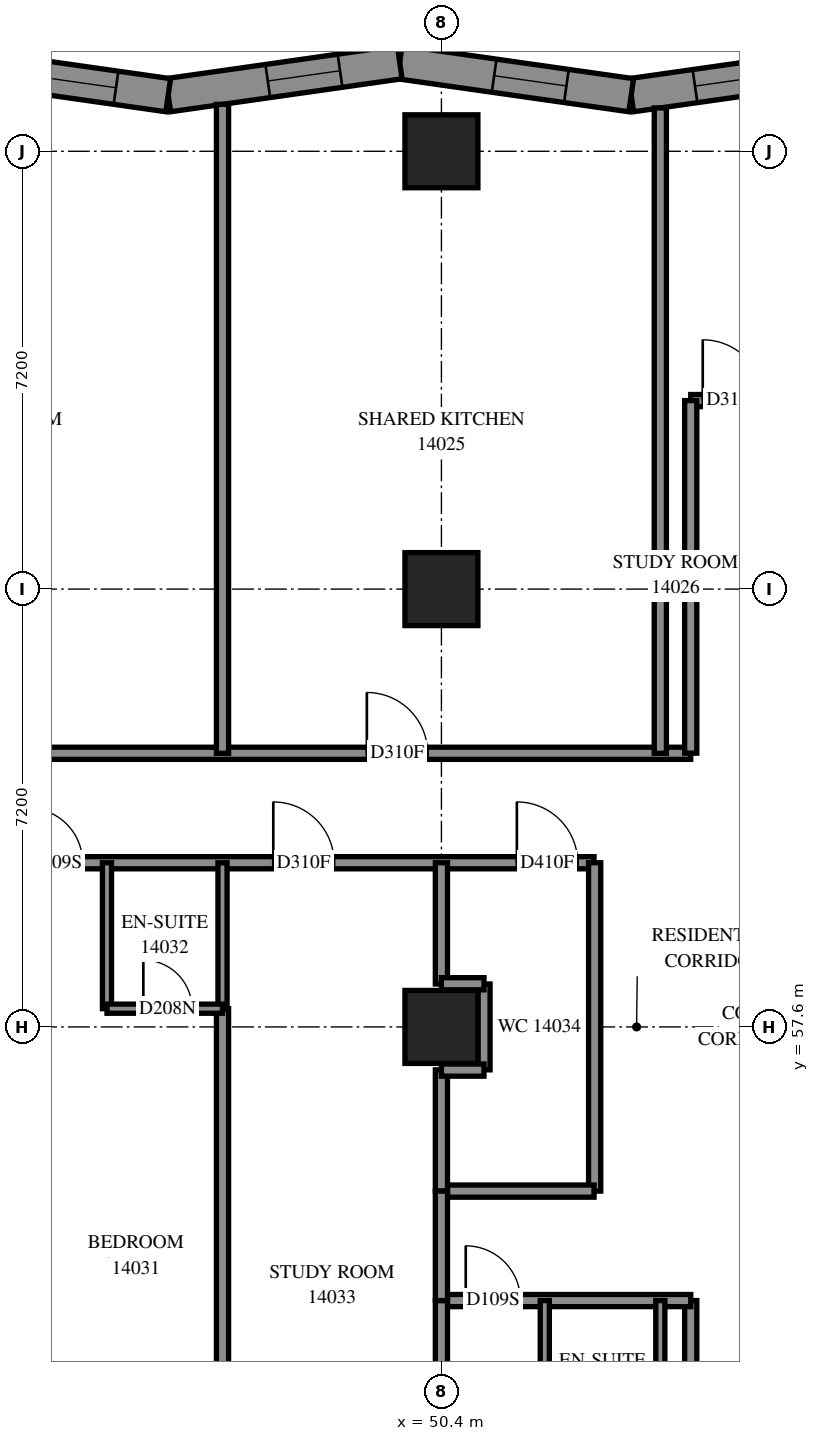
"""IFC4 building model, lengths in metres.
Left out: names, types, materials, properties, quantities, classifications, styles, units other than length and angle.
Written with IfcOpenShell. Run it as: python <this file> out.ifc"""

import sys

from ifc_helpers import new_model, si_unit, direction, frame, frame_2d, origin, origin_2d, place, context, subcontext, project, spatial, polyline, rectangle, outline, extrude, element, fill, save


model = new_model("IFC4")
c1 = context("Model", 3, precision=1e-05, world=origin(), true_north=direction((0.0, 1.0)))
c2 = subcontext(c1, "Body", "Model", "MODEL_VIEW")
j1 = project(units=[si_unit("LENGTHUNIT", "METRE"), si_unit("PLANEANGLEUNIT", "RADIAN")], contexts=[c1])
p1 = place(None, origin())
s1 = spatial("IfcSite", under=j1, at=p1, CompositionType="ELEMENT")
p2 = place(p1, origin())
s2 = spatial("IfcBuilding", under=s1, at=p2, CompositionType="ELEMENT")
p3 = place(p2, frame((0.0, 0.0, 54.2)))
s3 = spatial("IfcBuildingStorey", under=s2, at=p3, CompositionType="ELEMENT", Elevation=54.2)
for number, where, z_axis, x_axis in (
    (1, (50.4, 57.6, 0.0), (0.0, 0.0, 1.0), (1.0, 0.0, 0.0)),
    (2, (50.4, 64.8, 0.0), (0.0, 0.0, 1.0), (1.0, 0.0, 0.0)),
    (3, (50.4, 72.0, 0.0), (0.0, 0.0, 1.0), (1.0, 0.0, 0.0)),
):
    element("IfcColumn", number, at=place(p3, frame(where, z_axis=z_axis, x_axis=x_axis)), inside=s3, PredefinedType="COLUMN", context=c2, shape_type="SweptSolid", body=[
        extrude(rectangle(XDim=1.2, YDim=1.2, at=origin_2d()), origin(), (0.0, 0.0, 1.0), 3.1),
    ])
p4 = place(p3, frame((57.328, 73.464, 0.0), z_axis=(0.0, 0.0, 1.0), x_axis=(-0.990016994, -0.1409480459, 0.0)))
e4 = element("IfcWall", 4, at=p4, inside=s3, PredefinedType="SOLIDWALL", context=c2, shape_type="SweptSolid", body=[
    extrude(outline(polyline([(-0.039, -0.275), (3.806, -0.275), (3.885, 0.275), (0.039, 0.275), (-0.039, -0.275)])), origin(), (0.0, 0.0, 1.0), 3.1),
])
p5 = place(p4, frame((0.986, 0.0, 0.7)))
e5 = element("IfcOpeningElement", 5, at=p5, cuts=e4, PredefinedType="OPENING", context=c2, shape_type="SweptSolid", body=[
    extrude(rectangle(XDim=1.8, YDim=2.2, at=frame_2d((0.9, 1.1))), frame((0.0, 0.285, 0.0), z_axis=(0.0, -1.0, 0.0), x_axis=(1.0, 0.0, 0.0)), (0.0, 0.0, 1.0), 0.57),
])
p6 = place(p3, frame((53.521, 72.922, 0.0), z_axis=(0.0, 0.0, 1.0), x_axis=(-0.990016994, 0.1409480459, 0.0)))
e6 = element("IfcWall", 6, at=p6, inside=s3, PredefinedType="SOLIDWALL", context=c2, shape_type="SweptSolid", body=[
    extrude(outline(polyline([(0.039, -0.275), (3.885, -0.275), (3.806, 0.275), (-0.039, 0.275), (0.039, -0.275)])), origin(), (0.0, 0.0, 1.0), 3.1),
])
p7 = place(p6, frame((1.076, 0.0, 0.5)))
e7 = element("IfcOpeningElement", 7, at=p7, cuts=e6, PredefinedType="OPENING", context=c2, shape_type="SweptSolid", body=[
    extrude(rectangle(XDim=1.2, YDim=2.45, at=frame_2d((0.6, 1.225))), frame((0.0, 0.285, 0.0), z_axis=(0.0, -1.0, 0.0), x_axis=(1.0, 0.0, 0.0)), (0.0, 0.0, 1.0), 0.57),
])
p8 = place(p3, frame((49.714, 73.464, 0.0), z_axis=(0.0, 0.0, 1.0), x_axis=(-0.990016994, -0.1409480459, 0.0)))
e8 = element("IfcWall", 8, at=p8, inside=s3, PredefinedType="SOLIDWALL", context=c2, shape_type="SweptSolid", body=[
    extrude(outline(polyline([(-0.039, -0.275), (3.806, -0.275), (3.885, 0.275), (0.039, 0.275), (-0.039, -0.275)])), origin(), (0.0, 0.0, 1.0), 3.1),
])
p9 = place(p8, frame((0.991, 0.0, 0.5)))
e9 = element("IfcOpeningElement", 9, at=p9, cuts=e8, PredefinedType="OPENING", context=c2, shape_type="SweptSolid", body=[
    extrude(rectangle(XDim=1.2, YDim=2.45, at=frame_2d((0.6, 1.225))), frame((0.0, 0.285, 0.0), z_axis=(0.0, -1.0, 0.0), x_axis=(1.0, 0.0, 0.0)), (0.0, 0.0, 1.0), 0.57),
])
p10 = place(p3, frame((45.907, 72.922, 0.0), z_axis=(0.0, 0.0, 1.0), x_axis=(-0.9900175106, 0.1409444172, 0.0)))
e10 = element("IfcWall", 10, at=p10, inside=s3, PredefinedType="SOLIDWALL", context=c2, shape_type="SweptSolid", body=[
    extrude(outline(polyline([(0.039, -0.275), (3.885, -0.275), (3.806, 0.275), (-0.039, 0.275), (0.039, -0.275)])), origin(), (0.0, 0.0, 1.0), 3.1),
])
p11 = place(p10, frame((0.867, 0.0, 0.5)))
e11 = element("IfcOpeningElement", 11, at=p11, cuts=e10, PredefinedType="OPENING", context=c2, shape_type="SweptSolid", body=[
    extrude(rectangle(XDim=1.2, YDim=2.45, at=frame_2d((0.6, 1.225))), frame((0.0, 0.285, 0.0), z_axis=(0.0, -1.0, 0.0), x_axis=(1.0, 0.0, 0.0)), (0.0, 0.0, 1.0), 0.57),
])
p12 = place(p3, frame((28.802, 60.3, 0.0), z_axis=(0.0, 0.0, 1.0), x_axis=(1.0, 0.0, 0.0)))
e12 = element("IfcWall", 12, at=p12, inside=s3, PredefinedType="PARTITIONING", context=c2, shape_type="SweptSolid", body=[
    extrude(rectangle(XDim=24.108, YDim=0.2, at=frame_2d((12.054, 0.0))), origin(), (0.0, 0.0, 1.0), 3.1),
])
p13 = place(p12, frame((11.323, 0.0, 0.0)))
e13 = element("IfcOpeningElement", 13, at=p13, cuts=e12, PredefinedType="OPENING", context=c2, shape_type="SweptSolid", body=[
    extrude(rectangle(XDim=1.0, YDim=2.1, at=frame_2d((0.5, 1.05))), frame((0.0, 0.11, 0.0), z_axis=(0.0, -1.0, 0.0), x_axis=(1.0, 0.0, 0.0)), (0.0, 0.0, 1.0), 0.22),
])
p14 = place(p12, frame((14.798, 0.0, 0.0)))
e14 = element("IfcOpeningElement", 14, at=p14, cuts=e12, PredefinedType="OPENING", context=c2, shape_type="SweptSolid", body=[
    extrude(rectangle(XDim=0.9, YDim=2.1, at=frame_2d((0.45, 1.05))), frame((0.0, 0.11, 0.0), z_axis=(0.0, -1.0, 0.0), x_axis=(1.0, 0.0, 0.0)), (0.0, 0.0, 1.0), 0.22),
])
p15 = place(p12, frame((18.833, 0.0, 0.0)))
e15 = element("IfcOpeningElement", 15, at=p15, cuts=e12, PredefinedType="OPENING", context=c2, shape_type="SweptSolid", body=[
    extrude(rectangle(XDim=1.0, YDim=2.1, at=frame_2d((0.5, 1.05))), frame((0.0, 0.11, 0.0), z_axis=(0.0, -1.0, 0.0), x_axis=(1.0, 0.0, 0.0)), (0.0, 0.0, 1.0), 0.22),
])
p16 = place(p12, frame((22.839, 0.0, 0.0)))
e16 = element("IfcOpeningElement", 16, at=p16, cuts=e12, PredefinedType="OPENING", context=c2, shape_type="SweptSolid", body=[
    extrude(rectangle(XDim=1.0, YDim=2.1, at=frame_2d((0.5, 1.05))), frame((0.0, 0.11, 0.0), z_axis=(0.0, -1.0, 0.0), x_axis=(1.0, 0.0, 0.0)), (0.0, 0.0, 1.0), 0.22),
])
p17 = place(p3, frame((33.3, 62.1, 0.0), z_axis=(0.0, 0.0, 1.0), x_axis=(1.0, 0.0, 0.0)))
e17 = element("IfcWall", 17, at=p17, inside=s3, PredefinedType="PARTITIONING", context=c2, shape_type="SweptSolid", body=[
    extrude(rectangle(XDim=21.2, YDim=0.2, at=frame_2d((10.6, 0.0))), origin(), (0.0, 0.0, 1.0), 3.1),
])
p18 = place(p17, frame((1.395, 0.0, 0.0)))
e18 = element("IfcOpeningElement", 18, at=p18, cuts=e17, PredefinedType="OPENING", context=c2, shape_type="SweptSolid", body=[
    extrude(rectangle(XDim=0.9, YDim=2.1, at=frame_2d((0.45, 1.05))), frame((0.0, 0.11, 0.0), z_axis=(0.0, -1.0, 0.0), x_axis=(1.0, 0.0, 0.0)), (0.0, 0.0, 1.0), 0.22),
])
p19 = place(p17, frame((8.674, 0.0, 0.0)))
e19 = element("IfcOpeningElement", 19, at=p19, cuts=e17, PredefinedType="OPENING", context=c2, shape_type="SweptSolid", body=[
    extrude(rectangle(XDim=1.0, YDim=2.1, at=frame_2d((0.5, 1.05))), frame((0.0, 0.11, 0.0), z_axis=(0.0, -1.0, 0.0), x_axis=(1.0, 0.0, 0.0)), (0.0, 0.0, 1.0), 0.22),
])
p20 = place(p17, frame((15.874, 0.0, 0.0)))
e20 = element("IfcOpeningElement", 20, at=p20, cuts=e17, PredefinedType="OPENING", context=c2, shape_type="SweptSolid", body=[
    extrude(rectangle(XDim=1.0, YDim=2.1, at=frame_2d((0.5, 1.05))), frame((0.0, 0.11, 0.0), z_axis=(0.0, -1.0, 0.0), x_axis=(1.0, 0.0, 0.0)), (0.0, 0.0, 1.0), 0.22),
])
p21 = place(p3, frame((54.5, 67.9, 0.0), z_axis=(0.0, 0.0, 1.0), x_axis=(1.0, 0.0, 0.0)))
e21 = element("IfcWall", 21, at=p21, inside=s3, PredefinedType="PARTITIONING", context=c2, shape_type="SweptSolid", body=[
    extrude(rectangle(XDim=20.6, YDim=0.2, at=frame_2d((10.3, 0.0))), origin(), (0.0, 0.0, 1.0), 3.1),
])
p22 = place(p21, frame((0.198, 0.0, 0.0)))
e22 = element("IfcOpeningElement", 22, at=p22, cuts=e21, PredefinedType="OPENING", context=c2, shape_type="SweptSolid", body=[
    extrude(rectangle(XDim=1.0, YDim=2.1, at=frame_2d((0.5, 1.05))), frame((0.0, 0.11, 0.0), z_axis=(0.0, -1.0, 0.0), x_axis=(1.0, 0.0, 0.0)), (0.0, 0.0, 1.0), 0.22),
])
p23 = place(p21, frame((19.358, 0.0, 0.0)))
e23 = element("IfcOpeningElement", 23, at=p23, cuts=e21, PredefinedType="OPENING", context=c2, shape_type="SweptSolid", body=[
    extrude(rectangle(XDim=1.0, YDim=2.1, at=frame_2d((0.5, 1.05))), frame((0.0, 0.11, 0.0), z_axis=(0.0, -1.0, 0.0), x_axis=(1.0, 0.0, 0.0)), (0.0, 0.0, 1.0), 0.22),
])
p24 = place(p21, frame((6.698, 0.0, 0.0)))
e24 = element("IfcOpeningElement", 24, at=p24, cuts=e21, PredefinedType="OPENING", context=c2, shape_type="SweptSolid", body=[
    extrude(rectangle(XDim=0.9, YDim=2.1, at=frame_2d((0.45, 1.05))), frame((0.0, 0.11, 0.0), z_axis=(0.0, -1.0, 0.0), x_axis=(1.0, 0.0, 0.0)), (0.0, 0.0, 1.0), 0.22),
])
p25 = place(p21, frame((13.884, 0.0, 0.0)))
e25 = element("IfcOpeningElement", 25, at=p25, cuts=e21, PredefinedType="OPENING", context=c2, shape_type="SweptSolid", body=[
    extrude(rectangle(XDim=1.0, YDim=2.1, at=frame_2d((0.5, 1.05))), frame((0.0, 0.11, 0.0), z_axis=(0.0, -1.0, 0.0), x_axis=(1.0, 0.0, 0.0)), (0.0, 0.0, 1.0), 0.22),
])
p26 = place(p3, frame((46.8, 62.1, 0.0), z_axis=(0.0, 0.0, 1.0), x_axis=(0.0, 1.0, 0.0)))
e26 = element("IfcWall", 26, at=p26, inside=s3, PredefinedType="PARTITIONING", context=c2, shape_type="SweptSolid", body=[
    extrude(rectangle(XDim=10.672, YDim=0.2, at=frame_2d((5.336, 0.0))), origin(), (0.0, 0.0, 1.0), 3.1),
])
p27 = place(p3, frame((54.0, 62.1, 0.0), z_axis=(0.0, 0.0, 1.0), x_axis=(0.0, 1.0, 0.0)))
e27 = element("IfcWall", 27, at=p27, inside=s3, PredefinedType="PARTITIONING", context=c2, shape_type="SweptSolid", body=[
    extrude(rectangle(XDim=10.613, YDim=0.2, at=frame_2d((5.306, 0.0))), origin(), (0.0, 0.0, 1.0), 3.1),
])
p28 = place(p3, frame((46.8, 49.75, 0.0), z_axis=(0.0, 0.0, 1.0), x_axis=(0.0, 1.0, 0.0)))
e28 = element("IfcWall", 28, at=p28, inside=s3, PredefinedType="PARTITIONING", context=c2, shape_type="SweptSolid", body=[
    extrude(rectangle(XDim=8.15, YDim=0.2, at=frame_2d((4.075, 0.0))), origin(), (0.0, 0.0, 1.0), 3.1),
])
p29 = place(p3, frame((54.5, 47.3, 0.0), z_axis=(0.0, 0.0, 1.0), x_axis=(0.0, 1.0, 0.0)))
e29 = element("IfcWall", 29, at=p29, inside=s3, PredefinedType="PARTITIONING", context=c2, shape_type="SweptSolid", body=[
    extrude(rectangle(XDim=5.8, YDim=0.2, at=frame_2d((2.9, 0.0))), origin(), (0.0, 0.0, 1.0), 3.1),
])
p30 = place(p3, frame((54.5, 62.102, 0.0), z_axis=(0.0, 0.0, 1.0), x_axis=(0.0, 1.0, 0.0)))
e30 = element("IfcWall", 30, at=p30, inside=s3, PredefinedType="PARTITIONING", context=c2, shape_type="SweptSolid", body=[
    extrude(rectangle(XDim=5.798, YDim=0.2, at=frame_2d((2.899, 0.0))), origin(), (0.0, 0.0, 1.0), 3.1),
])
p31 = place(p3, frame((52.92, 54.9, 0.0), z_axis=(0.0, 0.0, 1.0), x_axis=(0.0, 1.0, 0.0)))
e31 = element("IfcWall", 31, at=p31, inside=s3, PredefinedType="PARTITIONING", context=c2, shape_type="SweptSolid", body=[
    extrude(rectangle(XDim=5.4, YDim=0.2, at=frame_2d((2.7, 0.0))), origin(), (0.0, 0.0, 1.0), 3.1),
])
p32 = place(p3, frame((50.4, 53.1, 0.0), z_axis=(0.0, 0.0, 1.0), x_axis=(1.0, 0.0, 0.0)))
e32 = element("IfcWall", 32, at=p32, inside=s3, PredefinedType="PARTITIONING", context=c2, shape_type="SweptSolid", body=[
    extrude(rectangle(XDim=4.1, YDim=0.2, at=frame_2d((2.05, 0.0))), origin(), (0.0, 0.0, 1.0), 3.1),
])
p33 = place(p32, frame((0.4, 0.0, 0.0)))
e33 = element("IfcOpeningElement", 33, at=p33, cuts=e32, PredefinedType="OPENING", context=c2, shape_type="SweptSolid", body=[
    extrude(rectangle(XDim=0.9, YDim=2.1, at=frame_2d((0.45, 1.05))), frame((0.0, 0.11, 0.0), z_axis=(0.0, -1.0, 0.0), x_axis=(1.0, 0.0, 0.0)), (0.0, 0.0, 1.0), 0.22),
])
p34 = place(p3, frame((50.4, 54.9, 0.0), z_axis=(0.0, 0.0, 1.0), x_axis=(1.0, 0.0, 0.0)))
e34 = element("IfcWall", 34, at=p34, inside=s3, PredefinedType="PARTITIONING", context=c2, shape_type="SweptSolid", body=[
    extrude(rectangle(XDim=2.51, YDim=0.2, at=frame_2d((1.255, 0.0))), origin(), (0.0, 0.0, 1.0), 3.1),
])
for number, where, z_axis, x_axis in (
    (35, (44.9, 57.9, 0.0), (0.0, 0.0, 1.0), (0.0, 1.0, 0.0)),
    (36, (46.8, 57.9, 0.0), (0.0, 0.0, 1.0), (0.0, 1.0, 0.0)),
    (37, (52.1, 50.7, 0.0), (0.0, 0.0, 1.0), (0.0, 1.0, 0.0)),
    (38, (54.0, 50.7, 0.0), (0.0, 0.0, 1.0), (0.0, 1.0, 0.0)),
):
    element("IfcWall", number, at=place(p3, frame(where, z_axis=z_axis, x_axis=x_axis)), inside=s3, PredefinedType="PARTITIONING", context=c2, shape_type="SweptSolid", body=[
        extrude(rectangle(XDim=2.4, YDim=0.15, at=frame_2d((1.2, 0.0))), origin(), (0.0, 0.0, 1.0), 3.1),
    ])
p35 = place(p3, frame((50.4, 51.0, 0.0), z_axis=(0.0, 0.0, 1.0), x_axis=(0.0, 1.0, 0.0)))
e39 = element("IfcWall", 39, at=p35, inside=s3, PredefinedType="PARTITIONING", context=c2, shape_type="SweptSolid", body=[
    extrude(rectangle(XDim=2.1, YDim=0.2, at=frame_2d((1.05, 0.0))), origin(), (0.0, 0.0, 1.0), 3.1),
])
for number, where, z_axis, x_axis in (
    (40, (50.4, 54.9, 0.0), (0.0, 0.0, 1.0), (0.0, 1.0, 0.0)),
    (41, (50.4, 58.306, 0.0), (0.0, 0.0, 1.0), (0.0, 1.0, 0.0)),
):
    element("IfcWall", number, at=place(p3, frame(where, z_axis=z_axis, x_axis=x_axis)), inside=s3, PredefinedType="PARTITIONING", context=c2, shape_type="SweptSolid", body=[
        extrude(rectangle(XDim=1.994, YDim=0.2, at=frame_2d((0.997, 0.0))), origin(), (0.0, 0.0, 1.0), 3.1),
    ])
p36 = place(p3, frame((44.9, 57.9, 0.0), z_axis=(0.0, 0.0, 1.0), x_axis=(1.0, 0.0, 0.0)))
e42 = element("IfcWall", 42, at=p36, inside=s3, PredefinedType="PARTITIONING", context=c2, shape_type="SweptSolid", body=[
    extrude(rectangle(XDim=1.9, YDim=0.15, at=frame_2d((0.95, 0.0))), origin(), (0.0, 0.0, 1.0), 3.1),
])
p37 = place(p36, frame((0.598, 0.0, 0.0)))
e43 = element("IfcOpeningElement", 43, at=p37, cuts=e42, PredefinedType="OPENING", context=c2, shape_type="SweptSolid", body=[
    extrude(rectangle(XDim=0.8, YDim=2.1, at=frame_2d((0.4, 1.05))), frame((0.0, 0.085, 0.0), z_axis=(0.0, -1.0, 0.0), x_axis=(1.0, 0.0, 0.0)), (0.0, 0.0, 1.0), 0.17),
])
p38 = place(p3, frame((50.4, 53.1, 0.0), z_axis=(0.0, 0.0, 1.0), x_axis=(0.0, 1.0, 0.0)))
e44 = element("IfcWall", 44, at=p38, inside=s3, PredefinedType="PARTITIONING", context=c2, shape_type="SweptSolid", body=[
    extrude(rectangle(XDim=1.8, YDim=0.2, at=frame_2d((0.9, 0.0))), origin(), (0.0, 0.0, 1.0), 3.1),
])
p39 = place(p3, frame((51.1, 56.894, 0.0), z_axis=(0.0, 0.0, 1.0), x_axis=(0.0, 1.0, 0.0)))
e45 = element("IfcWall", 45, at=p39, inside=s3, PredefinedType="PARTITIONING", context=c2, shape_type="SweptSolid", body=[
    extrude(rectangle(XDim=1.412, YDim=0.2, at=frame_2d((0.706, 0.0))), origin(), (0.0, 0.0, 1.0), 3.1),
])
for number, where, z_axis, x_axis in (
    (46, (50.4, 58.31, 0.0), (0.0, 0.0, 1.0), (1.0, 0.0, 0.0)),
    (47, (50.4, 56.89, 0.0), (0.0, 0.0, 1.0), (1.0, 0.0, 0.0)),
):
    element("IfcWall", number, at=place(p3, frame(where, z_axis=z_axis, x_axis=x_axis)), inside=s3, PredefinedType="PARTITIONING", context=c2, shape_type="SweptSolid", body=[
        extrude(rectangle(XDim=0.7, YDim=0.2, at=frame_2d((0.35, 0.0))), origin(), (0.0, 0.0, 1.0), 3.1),
    ])
p40 = place(p7, origin())
e48 = element("IfcWindow", 48, at=p40, inside=s3, PartitioningType="SINGLE_PANEL", PredefinedType="WINDOW", context=c2, shape_type="SweptSolid", body=[
    extrude(rectangle(XDim=1.2, YDim=2.45, at=frame_2d((0.6, 1.225))), frame((0.0, 0.155, 0.0), z_axis=(0.0, -1.0, 0.0), x_axis=(1.0, 0.0, 0.0)), (0.0, 0.0, 1.0), 0.06),
])
fill(e7, e48)
p41 = place(p9, origin())
e49 = element("IfcWindow", 49, at=p41, inside=s3, PartitioningType="SINGLE_PANEL", PredefinedType="WINDOW", context=c2, shape_type="SweptSolid", body=[
    extrude(rectangle(XDim=1.2, YDim=2.45, at=frame_2d((0.6, 1.225))), frame((0.0, 0.155, 0.0), z_axis=(0.0, -1.0, 0.0), x_axis=(1.0, 0.0, 0.0)), (0.0, 0.0, 1.0), 0.06),
])
fill(e9, e49)
p42 = place(p11, origin())
e50 = element("IfcWindow", 50, at=p42, inside=s3, PartitioningType="SINGLE_PANEL", PredefinedType="WINDOW", context=c2, shape_type="SweptSolid", body=[
    extrude(rectangle(XDim=1.2, YDim=2.45, at=frame_2d((0.6, 1.225))), frame((0.0, 0.155, 0.0), z_axis=(0.0, -1.0, 0.0), x_axis=(1.0, 0.0, 0.0)), (0.0, 0.0, 1.0), 0.06),
])
fill(e11, e50)
p43 = place(p20, origin())
e51 = element("IfcDoor", 51, at=p43, inside=s3, OperationType="SINGLE_SWING_LEFT", PredefinedType="DOOR", context=c2, shape_type="SweptSolid", body=[
    extrude(rectangle(XDim=1.0, YDim=2.1, at=frame_2d((0.5, 1.05))), frame((0.0, 0.025, 0.0), z_axis=(0.0, -1.0, 0.0), x_axis=(1.0, 0.0, 0.0)), (0.0, 0.0, 1.0), 0.05),
])
fill(e20, e51)
p44 = place(p22, origin())
e52 = element("IfcDoor", 52, at=p44, inside=s3, OperationType="SINGLE_SWING_LEFT", PredefinedType="DOOR", context=c2, shape_type="SweptSolid", body=[
    extrude(rectangle(XDim=1.0, YDim=2.1, at=frame_2d((0.5, 1.05))), frame((0.0, 0.025, 0.0), z_axis=(0.0, -1.0, 0.0), x_axis=(1.0, 0.0, 0.0)), (0.0, 0.0, 1.0), 0.05),
])
fill(e22, e52)
p45 = place(p14, origin())
e53 = element("IfcDoor", 53, at=p45, inside=s3, OperationType="SINGLE_SWING_LEFT", PredefinedType="DOOR", context=c2, shape_type="SweptSolid", body=[
    extrude(rectangle(XDim=0.9, YDim=2.1, at=frame_2d((0.45, 1.05))), frame((0.0, 0.025, 0.0), z_axis=(0.0, -1.0, 0.0), x_axis=(1.0, 0.0, 0.0)), (0.0, 0.0, 1.0), 0.05),
])
fill(e14, e53)
p46 = place(p37, origin())
e54 = element("IfcDoor", 54, at=p46, inside=s3, OperationType="SINGLE_SWING_RIGHT", PredefinedType="DOOR", context=c2, shape_type="SweptSolid", body=[
    extrude(rectangle(XDim=0.8, YDim=2.1, at=frame_2d((0.4, 1.05))), frame((0.0, 0.025, 0.0), z_axis=(0.0, -1.0, 0.0), x_axis=(1.0, 0.0, 0.0)), (0.0, 0.0, 1.0), 0.05),
])
fill(e43, e54)
p47 = place(p15, origin())
e55 = element("IfcDoor", 55, at=p47, inside=s3, OperationType="SINGLE_SWING_RIGHT", PredefinedType="DOOR", context=c2, shape_type="SweptSolid", body=[
    extrude(rectangle(XDim=1.0, YDim=2.1, at=frame_2d((0.5, 1.05))), frame((0.0, 0.025, 0.0), z_axis=(0.0, -1.0, 0.0), x_axis=(1.0, 0.0, 0.0)), (0.0, 0.0, 1.0), 0.05),
])
fill(e15, e55)
p48 = place(p16, origin())
e56 = element("IfcDoor", 56, at=p48, inside=s3, OperationType="SINGLE_SWING_LEFT", PredefinedType="DOOR", context=c2, shape_type="SweptSolid", body=[
    extrude(rectangle(XDim=1.0, YDim=2.1, at=frame_2d((0.5, 1.05))), frame((0.0, 0.025, 0.0), z_axis=(0.0, -1.0, 0.0), x_axis=(1.0, 0.0, 0.0)), (0.0, 0.0, 1.0), 0.05),
])
fill(e16, e56)
p49 = place(p33, origin())
e57 = element("IfcDoor", 57, at=p49, inside=s3, OperationType="SINGLE_SWING_LEFT", PredefinedType="DOOR", context=c2, shape_type="SweptSolid", body=[
    extrude(rectangle(XDim=0.9, YDim=2.1, at=frame_2d((0.45, 1.05))), frame((0.0, 0.025, 0.0), z_axis=(0.0, -1.0, 0.0), x_axis=(1.0, 0.0, 0.0)), (0.0, 0.0, 1.0), 0.05),
])
fill(e33, e57)
p50 = place(p5, origin())
e58 = element("IfcWindow", 58, at=p50, inside=s3, PartitioningType="SINGLE_PANEL", PredefinedType="WINDOW", context=c2, shape_type="SweptSolid", body=[
    extrude(rectangle(XDim=1.8, YDim=2.2, at=frame_2d((0.9, 1.1))), frame((0.0, 0.155, 0.0), z_axis=(0.0, -1.0, 0.0), x_axis=(1.0, 0.0, 0.0)), (0.0, 0.0, 1.0), 0.06),
])
fill(e5, e58)
save(model, sys.argv[1])
